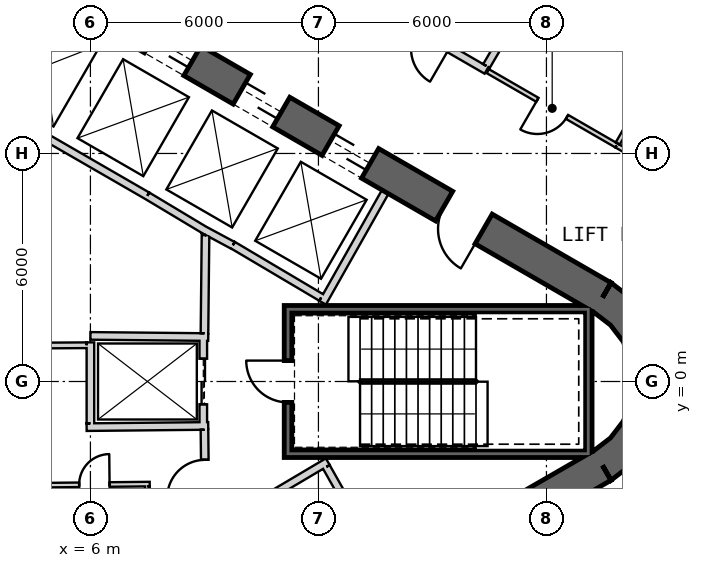
"""IFC4 building model, lengths in metres.
Left out: names, types, materials, properties, quantities, classifications, styles, units other than length and angle.
Written with IfcOpenShell. Run it as: python <this file> out.ifc"""

import sys

from ifc_helpers import new_model, si_unit, direction, frame, frame_2d, origin, place, context, subcontext, project, spatial, polyline, rectangle, outline, extrude, element, fill, save


model = new_model("IFC4")
c1 = context("Model", 3, precision=1e-05, world=origin(), true_north=direction((0.0, 1.0)))
c2 = subcontext(c1, "Body", "Model", "MODEL_VIEW")
j1 = project(units=[si_unit("LENGTHUNIT", "METRE"), si_unit("PLANEANGLEUNIT", "RADIAN")], contexts=[c1])
p1 = place(None, origin())
s1 = spatial("IfcSite", under=j1, at=p1, CompositionType="ELEMENT")
p2 = place(p1, origin())
s2 = spatial("IfcBuilding", under=s1, at=p2, CompositionType="ELEMENT")
p3 = place(p2, frame((0.0, 0.0, 45.5)))
s3 = spatial("IfcBuildingStorey", under=s2, at=p3, CompositionType="ELEMENT", Elevation=45.5)
p4 = place(p3, frame((19.475, 2.208, 0.0), z_axis=(0.0, 0.0, 1.0), x_axis=(-0.866028369851, 0.499994862586, 0.0)))
e1 = element("IfcWall", 1, at=p4, inside=s3, PredefinedType="SHEAR", context=c2, shape_type="SweptSolid", body=[
    extrude(rectangle(XDim=31.523, YDim=0.9, at=frame_2d((15.762, 0.0))), origin(), (0.0, 0.0, 1.0), 4.1),
])
p5 = place(p4, frame((7.062, 0.0, 0.0)))
e2 = element("IfcOpeningElement", 2, at=p5, cuts=e1, PredefinedType="OPENING", context=c2, shape_type="SweptSolid", body=[
    extrude(rectangle(XDim=1.2, YDim=2.4, at=frame_2d((0.6, 1.2))), frame((0.0, 0.46, 0.0), z_axis=(0.0, -1.0, 0.0), x_axis=(1.0, 0.0, 0.0)), (0.0, 0.0, 1.0), 0.92),
])
p6 = place(p4, frame((9.762, 0.0, 0.0)))
e3 = element("IfcOpeningElement", 3, at=p6, cuts=e1, PredefinedType="OPENING", context=c2, shape_type="SweptSolid", body=[
    extrude(rectangle(XDim=1.2, YDim=2.4, at=frame_2d((0.6, 1.2))), frame((0.0, 0.46, 0.0), z_axis=(0.0, -1.0, 0.0), x_axis=(1.0, 0.0, 0.0)), (0.0, 0.0, 1.0), 0.92),
])
p7 = place(p4, frame((12.462, 0.0, 0.0)))
e4 = element("IfcOpeningElement", 4, at=p7, cuts=e1, PredefinedType="OPENING", context=c2, shape_type="SweptSolid", body=[
    extrude(rectangle(XDim=1.2, YDim=2.4, at=frame_2d((0.6, 1.2))), frame((0.0, 0.46, 0.0), z_axis=(0.0, -1.0, 0.0), x_axis=(1.0, 0.0, 0.0)), (0.0, 0.0, 1.0), 0.92),
])
p8 = place(p4, frame((15.162, 0.0, 0.0)))
e5 = element("IfcOpeningElement", 5, at=p8, cuts=e1, PredefinedType="OPENING", context=c2, shape_type="SweptSolid", body=[
    extrude(rectangle(XDim=1.2, YDim=2.4, at=frame_2d((0.6, 1.2))), frame((0.0, 0.46, 0.0), z_axis=(0.0, -1.0, 0.0), x_axis=(1.0, 0.0, 0.0)), (0.0, 0.0, 1.0), 0.92),
])
p9 = place(p4, frame((17.862, 0.0, 0.0)))
e6 = element("IfcOpeningElement", 6, at=p9, cuts=e1, PredefinedType="OPENING", context=c2, shape_type="SweptSolid", body=[
    extrude(rectangle(XDim=1.2, YDim=2.4, at=frame_2d((0.6, 1.2))), frame((0.0, 0.46, 0.0), z_axis=(0.0, -1.0, 0.0), x_axis=(1.0, 0.0, 0.0)), (0.0, 0.0, 1.0), 0.92),
])
p10 = place(p4, frame((20.562, 0.0, 0.0)))
e7 = element("IfcOpeningElement", 7, at=p10, cuts=e1, PredefinedType="OPENING", context=c2, shape_type="SweptSolid", body=[
    extrude(rectangle(XDim=1.2, YDim=2.4, at=frame_2d((0.6, 1.2))), frame((0.0, 0.46, 0.0), z_axis=(0.0, -1.0, 0.0), x_axis=(1.0, 0.0, 0.0)), (0.0, 0.0, 1.0), 0.92),
])
p11 = place(p4, frame((23.262, 0.0, 0.0)))
e8 = element("IfcOpeningElement", 8, at=p11, cuts=e1, PredefinedType="OPENING", context=c2, shape_type="SweptSolid", body=[
    extrude(rectangle(XDim=1.2, YDim=2.4, at=frame_2d((0.6, 1.2))), frame((0.0, 0.46, 0.0), z_axis=(0.0, -1.0, 0.0), x_axis=(1.0, 0.0, 0.0)), (0.0, 0.0, 1.0), 0.92),
])
p12 = place(p4, frame((3.612, 0.0, 0.0)))
e9 = element("IfcOpeningElement", 9, at=p12, cuts=e1, PredefinedType="OPENING", context=c2, shape_type="SweptSolid", body=[
    extrude(rectangle(XDim=1.2, YDim=2.4, at=frame_2d((0.6, 1.2))), frame((0.0, 0.46, 0.0), z_axis=(0.0, -1.0, 0.0), x_axis=(1.0, 0.0, 0.0)), (0.0, 0.0, 1.0), 0.92),
])
p13 = place(p4, frame((26.712, 0.0, 0.0)))
e10 = element("IfcOpeningElement", 10, at=p13, cuts=e1, PredefinedType="OPENING", context=c2, shape_type="SweptSolid", body=[
    extrude(rectangle(XDim=1.2, YDim=2.4, at=frame_2d((0.6, 1.2))), frame((0.0, 0.46, 0.0), z_axis=(0.0, -1.0, 0.0), x_axis=(1.0, 0.0, 0.0)), (0.0, 0.0, 1.0), 0.92),
])
p14 = place(p3, frame((-7.825, -17.97, 0.0), z_axis=(0.0, 0.0, 1.0), x_axis=(0.866028369851, 0.499994862586, 0.0)))
e11 = element("IfcWall", 11, at=p14, inside=s3, PredefinedType="SHEAR", context=c2, shape_type="SweptSolid", body=[
    extrude(rectangle(XDim=31.523, YDim=0.9, at=frame_2d((15.762, 0.0))), origin(), (0.0, 0.0, 1.0), 4.1),
])
p15 = place(p14, frame((7.062, 0.0, 0.0)))
e12 = element("IfcOpeningElement", 12, at=p15, cuts=e11, PredefinedType="OPENING", context=c2, shape_type="SweptSolid", body=[
    extrude(rectangle(XDim=1.2, YDim=2.4, at=frame_2d((0.6, 1.2))), frame((0.0, 0.46, 0.0), z_axis=(0.0, -1.0, 0.0), x_axis=(1.0, 0.0, 0.0)), (0.0, 0.0, 1.0), 0.92),
])
p16 = place(p14, frame((9.762, 0.0, 0.0)))
e13 = element("IfcOpeningElement", 13, at=p16, cuts=e11, PredefinedType="OPENING", context=c2, shape_type="SweptSolid", body=[
    extrude(rectangle(XDim=1.2, YDim=2.4, at=frame_2d((0.6, 1.2))), frame((0.0, 0.46, 0.0), z_axis=(0.0, -1.0, 0.0), x_axis=(1.0, 0.0, 0.0)), (0.0, 0.0, 1.0), 0.92),
])
p17 = place(p14, frame((12.462, 0.0, 0.0)))
e14 = element("IfcOpeningElement", 14, at=p17, cuts=e11, PredefinedType="OPENING", context=c2, shape_type="SweptSolid", body=[
    extrude(rectangle(XDim=1.2, YDim=2.4, at=frame_2d((0.6, 1.2))), frame((0.0, 0.46, 0.0), z_axis=(0.0, -1.0, 0.0), x_axis=(1.0, 0.0, 0.0)), (0.0, 0.0, 1.0), 0.92),
])
p18 = place(p14, frame((15.162, 0.0, 0.0)))
e15 = element("IfcOpeningElement", 15, at=p18, cuts=e11, PredefinedType="OPENING", context=c2, shape_type="SweptSolid", body=[
    extrude(rectangle(XDim=1.2, YDim=2.4, at=frame_2d((0.6, 1.2))), frame((0.0, 0.46, 0.0), z_axis=(0.0, -1.0, 0.0), x_axis=(1.0, 0.0, 0.0)), (0.0, 0.0, 1.0), 0.92),
])
p19 = place(p14, frame((17.862, 0.0, 0.0)))
e16 = element("IfcOpeningElement", 16, at=p19, cuts=e11, PredefinedType="OPENING", context=c2, shape_type="SweptSolid", body=[
    extrude(rectangle(XDim=1.2, YDim=2.4, at=frame_2d((0.6, 1.2))), frame((0.0, 0.46, 0.0), z_axis=(0.0, -1.0, 0.0), x_axis=(1.0, 0.0, 0.0)), (0.0, 0.0, 1.0), 0.92),
])
p20 = place(p14, frame((20.562, 0.0, 0.0)))
e17 = element("IfcOpeningElement", 17, at=p20, cuts=e11, PredefinedType="OPENING", context=c2, shape_type="SweptSolid", body=[
    extrude(rectangle(XDim=1.2, YDim=2.4, at=frame_2d((0.6, 1.2))), frame((0.0, 0.46, 0.0), z_axis=(0.0, -1.0, 0.0), x_axis=(1.0, 0.0, 0.0)), (0.0, 0.0, 1.0), 0.92),
])
p21 = place(p14, frame((26.712, 0.0, 0.0)))
e18 = element("IfcOpeningElement", 18, at=p21, cuts=e11, PredefinedType="OPENING", context=c2, shape_type="SweptSolid", body=[
    extrude(rectangle(XDim=1.2, YDim=2.4, at=frame_2d((0.6, 1.2))), frame((0.0, 0.46, 0.0), z_axis=(0.0, -1.0, 0.0), x_axis=(1.0, 0.0, 0.0)), (0.0, 0.0, 1.0), 0.92),
])
p22 = place(p14, frame((3.612, 0.0, 0.0)))
e19 = element("IfcOpeningElement", 19, at=p22, cuts=e11, PredefinedType="OPENING", context=c2, shape_type="SweptSolid", body=[
    extrude(rectangle(XDim=1.2, YDim=2.4, at=frame_2d((0.6, 1.2))), frame((0.0, 0.46, 0.0), z_axis=(0.0, -1.0, 0.0), x_axis=(1.0, 0.0, 0.0)), (0.0, 0.0, 1.0), 0.92),
])
p23 = place(p3, origin())
e20 = element("IfcWall", 20, at=p23, inside=s3, PredefinedType="SHEAR", context=c2, shape_type="SweptSolid", body=[
    extrude(outline(polyline([(19.7, -2.598), (20.321, -2.121), (20.798, -1.5), (21.098, -0.777), (21.2, 0.0), (21.098, 0.777), (20.798, 1.5), (20.321, 2.121), (19.7, 2.598), (19.25, 1.819), (19.685, 1.485), (20.019, 1.05), (20.229, 0.543), (20.3, 0.0), (20.229, -0.543), (20.019, -1.05), (19.685, -1.485), (19.25, -1.819), (19.7, -2.598)])), origin(), (0.0, 0.0, 1.0), 4.1),
])
p24 = place(p3, frame((7.497, 4.886, 0.0), z_axis=(0.0, 0.0, 1.0), x_axis=(-0.866030989016, 0.499990325971, 0.0)))
e21 = element("IfcWall", 21, at=p24, inside=s3, PredefinedType="PLUMBINGWALL", context=c2, shape_type="SweptSolid", body=[
    extrude(rectangle(XDim=8.1, YDim=0.2, at=frame_2d((4.05, 0.0))), origin(), (0.0, 0.0, 1.0), 3.8),
])
p25 = place(p3, frame((12.11, 2.073, 0.0), z_axis=(0.0, 0.0, 1.0), x_axis=(0.49196600604, 0.870614408852, 0.0)))
e22 = element("IfcWall", 22, at=p25, inside=s3, PredefinedType="PLUMBINGWALL", context=c2, shape_type="SweptSolid", body=[
    extrude(rectangle(XDim=3.35, YDim=0.2, at=frame_2d((1.675, 0.0))), origin(), (0.0, 0.0, 1.0), 3.8),
])
p26 = place(p3, frame((12.073, 2.211, 0.0), z_axis=(0.0, 0.0, 1.0), x_axis=(-0.860438357912, 0.509554542943, 0.0)))
e23 = element("IfcWall", 23, at=p26, inside=s3, PredefinedType="PLUMBINGWALL", context=c2, shape_type="SweptSolid", body=[
    extrude(rectangle(XDim=2.7, YDim=0.2, at=frame_2d((1.35, 0.0))), origin(), (0.0, 0.0, 1.0), 3.8),
])
p27 = place(p3, frame((9.748, 3.583, 0.0), z_axis=(0.0, 0.0, 1.0), x_axis=(-0.880917147855, 0.473270513147, 0.0)))
e24 = element("IfcWall", 24, at=p27, inside=s3, PredefinedType="PLUMBINGWALL", context=c2, shape_type="SweptSolid", body=[
    extrude(rectangle(XDim=0.878, YDim=0.2, at=frame_2d((0.439, 0.0))), origin(), (0.0, 0.0, 1.0), 3.8),
])
p28 = place(p3, frame((9.079, 3.937, 0.0), z_axis=(0.0, 0.0, 1.0), x_axis=(-0.857516281273, 0.51445682749, 0.0)))
e25 = element("IfcWall", 25, at=p28, inside=s3, PredefinedType="PLUMBINGWALL", context=c2, shape_type="SweptSolid", body=[
    extrude(rectangle(XDim=1.845, YDim=0.2, at=frame_2d((0.922, 0.0))), origin(), (0.0, 0.0, 1.0), 3.8),
])
p29 = place(p3, frame((19.2, 1.9, -0.3), z_axis=(0.0, 0.0, 1.0), x_axis=(-1.0, 0.0, 0.0)))
e26 = element("IfcWall", 26, at=p29, inside=s3, PredefinedType="SHEAR", context=c2, shape_type="SweptSolid", body=[
    extrude(rectangle(XDim=8.1, YDim=0.2, at=frame_2d((4.05, 0.0))), origin(), (0.0, 0.0, 1.0), 4.1),
])
p30 = place(p3, frame((19.1, -2.0, -0.3), z_axis=(0.0, 0.0, 1.0), x_axis=(0.0, 1.0, 0.0)))
e27 = element("IfcWall", 27, at=p30, inside=s3, PredefinedType="SHEAR", context=c2, shape_type="SweptSolid", body=[
    extrude(rectangle(XDim=3.8, YDim=0.2, at=frame_2d((1.9, 0.0))), origin(), (0.0, 0.0, 1.0), 4.1),
])
p31 = place(p3, frame((11.1, -1.9, -0.3), z_axis=(0.0, 0.0, 1.0), x_axis=(1.0, 0.0, 0.0)))
e28 = element("IfcWall", 28, at=p31, inside=s3, PredefinedType="SHEAR", context=c2, shape_type="SweptSolid", body=[
    extrude(rectangle(XDim=7.9, YDim=0.2, at=frame_2d((3.95, 0.0))), origin(), (0.0, 0.0, 1.0), 4.1),
])
p32 = place(p3, frame((11.2, -1.8, -0.3), z_axis=(0.0, 0.0, 1.0), x_axis=(0.0, 1.0, 0.0)))
e29 = element("IfcWall", 29, at=p32, inside=s3, PredefinedType="SHEAR", context=c2, shape_type="SweptSolid", body=[
    extrude(rectangle(XDim=3.6, YDim=0.2, at=frame_2d((1.8, 0.0))), origin(), (0.0, 0.0, 1.0), 4.1),
])
p33 = place(p32, frame((1.25, 0.0, 0.3)))
e30 = element("IfcOpeningElement", 30, at=p33, cuts=e29, PredefinedType="OPENING", context=c2, shape_type="SweptSolid", body=[
    extrude(rectangle(XDim=1.1, YDim=2.1, at=frame_2d((0.55, 1.05))), frame((0.0, 0.11, 0.0), z_axis=(0.0, -1.0, 0.0), x_axis=(1.0, 0.0, 0.0)), (0.0, 0.0, 1.0), 0.22),
])
p34 = place(p3, frame((8.97, 1.2, 0.0), z_axis=(0.0, 0.0, 1.0), x_axis=(0.0, -1.0, 0.0)))
e31 = element("IfcWall", 31, at=p34, inside=s3, PredefinedType="PLUMBINGWALL", context=c2, shape_type="SweptSolid", body=[
    extrude(rectangle(XDim=2.4, YDim=0.2, at=frame_2d((1.2, 0.0))), origin(), (0.0, 0.0, 1.0), 3.8),
])
p35 = place(p34, frame((0.6, 0.0, 0.0)))
e32 = element("IfcOpeningElement", 32, at=p35, cuts=e31, PredefinedType="OPENING", context=c2, shape_type="SweptSolid", body=[
    extrude(rectangle(XDim=1.2, YDim=2.4, at=frame_2d((0.6, 1.2))), frame((0.0, 0.11, 0.0), z_axis=(0.0, -1.0, 0.0), x_axis=(1.0, 0.0, 0.0)), (0.0, 0.0, 1.0), 0.22),
])
p36 = place(p3, frame((6.0, 1.2, 0.0), z_axis=(0.0, 0.0, 1.0), x_axis=(0.999949988, -0.010001074852, 0.0)))
e33 = element("IfcWall", 33, at=p36, inside=s3, PredefinedType="PLUMBINGWALL", context=c2, shape_type="SweptSolid", body=[
    extrude(rectangle(XDim=3.1, YDim=0.2, at=frame_2d((1.55, 0.0))), origin(), (0.0, 0.0, 1.0), 3.8),
])
p37 = place(p3, frame((5.9, -1.201, 0.0), z_axis=(0.0, 0.0, 1.0), x_axis=(0.999950064753, 0.009993397809, 0.0)))
e34 = element("IfcWall", 34, at=p37, inside=s3, PredefinedType="PLUMBINGWALL", context=c2, shape_type="SweptSolid", body=[
    extrude(rectangle(XDim=3.2, YDim=0.2, at=frame_2d((1.6, 0.0))), origin(), (0.0, 0.0, 1.0), 3.8),
])
p38 = place(p3, frame((6.0, -1.1, 0.0), z_axis=(0.0, 0.0, 1.0), x_axis=(0.0, 1.0, 0.0)))
e35 = element("IfcWall", 35, at=p38, inside=s3, PredefinedType="PLUMBINGWALL", context=c2, shape_type="SweptSolid", body=[
    extrude(rectangle(XDim=2.13, YDim=0.2, at=frame_2d((1.065, 0.0))), origin(), (0.0, 0.0, 1.0), 3.8),
])
p39 = place(p3, frame((12.245, -2.109, 0.0), z_axis=(0.0, 0.0, 1.0), x_axis=(-0.860414880418, -0.509594185166, 0.0)))
e36 = element("IfcWall", 36, at=p39, inside=s3, PredefinedType="PARTITIONING", context=c2, shape_type="SweptSolid", body=[
    extrude(rectangle(XDim=2.7, YDim=0.2, at=frame_2d((1.35, 0.0))), origin(), (0.0, 0.0, 1.0), 3.8),
])
p40 = place(p3, frame((13.758, -4.99, 0.0), z_axis=(0.0, 0.0, 1.0), x_axis=(-0.491993409184, 0.87059892334, 0.0)))
e37 = element("IfcWall", 37, at=p40, inside=s3, PredefinedType="PARTITIONING", context=c2, shape_type="SweptSolid", body=[
    extrude(rectangle(XDim=3.15, YDim=0.2, at=frame_2d((1.575, 0.0))), origin(), (0.0, 0.0, 1.0), 3.8),
])
p41 = place(p40, frame((1.175, 0.0, 0.0)))
e38 = element("IfcOpeningElement", 38, at=p41, cuts=e37, PredefinedType="OPENING", context=c2, shape_type="SweptSolid", body=[
    extrude(rectangle(XDim=0.8, YDim=2.1, at=frame_2d((0.4, 1.05))), frame((0.0, 0.11, 0.0), z_axis=(0.0, -1.0, 0.0), x_axis=(1.0, 0.0, 0.0)), (0.0, 0.0, 1.0), 0.22),
])
p42 = place(p3, frame((9.001, 1.27, 0.0), z_axis=(0.0, 0.0, 1.0), x_axis=(0.010784614026, 0.999941844359, 0.0)))
e39 = element("IfcWall", 39, at=p42, inside=s3, PredefinedType="PARTITIONING", context=c2, shape_type="SweptSolid", body=[
    extrude(rectangle(XDim=2.581, YDim=0.2, at=frame_2d((1.291, 0.0))), origin(), (0.0, 0.0, 1.0), 3.8),
])
p43 = place(p3, frame((9.029, -3.851, 0.0), z_axis=(0.0, 0.0, 1.0), x_axis=(-0.010783593937, 0.99994185536, 0.0)))
e40 = element("IfcWall", 40, at=p43, inside=s3, PredefinedType="PARTITIONING", context=c2, shape_type="SweptSolid", body=[
    extrude(rectangle(XDim=2.581, YDim=0.2, at=frame_2d((1.291, 0.0))), origin(), (0.0, 0.0, 1.0), 3.8),
])
p44 = place(p43, frame((0.791, 0.0, 0.0)))
e41 = element("IfcOpeningElement", 41, at=p44, cuts=e40, PredefinedType="OPENING", context=c2, shape_type="SweptSolid", body=[
    extrude(rectangle(XDim=1.0, YDim=2.1, at=frame_2d((0.5, 1.05))), frame((0.0, 0.11, 0.0), z_axis=(0.0, -1.0, 0.0), x_axis=(1.0, 0.0, 0.0)), (0.0, 0.0, 1.0), 0.22),
])
p45 = place(p3, frame((1.214, 0.924, 0.0), z_axis=(0.0, 0.0, 1.0), x_axis=(0.999979796062, 0.006356686907, 0.0)))
e42 = element("IfcWall", 42, at=p45, inside=s3, PredefinedType="PLUMBINGWALL", context=c2, shape_type="SweptSolid", body=[
    extrude(rectangle(XDim=4.686, YDim=0.15, at=frame_2d((2.343, 0.0))), origin(), (0.0, 0.0, 1.0), 3.8),
])
p46 = place(p45, frame((2.007, 0.0, 0.0)))
e43 = element("IfcOpeningElement", 43, at=p46, cuts=e42, PredefinedType="OPENING", context=c2, shape_type="SweptSolid", body=[
    extrude(rectangle(XDim=0.8, YDim=2.1, at=frame_2d((0.4, 1.05))), frame((0.0, 0.085, 0.0), z_axis=(0.0, -1.0, 0.0), x_axis=(1.0, 0.0, 0.0)), (0.0, 0.0, 1.0), 0.17),
])
p47 = place(p3, frame((7.56, -2.699, 0.0), z_axis=(0.0, 0.0, 1.0), x_axis=(-0.999948120507, -0.010186083405, 0.0)))
e44 = element("IfcWall", 44, at=p47, inside=s3, PredefinedType="PARTITIONING", context=c2, shape_type="SweptSolid", body=[
    extrude(rectangle(XDim=2.852, YDim=0.12, at=frame_2d((1.426, 0.0))), origin(), (0.0, 0.0, 1.0), 3.8),
])
p48 = place(p47, frame((1.056, 0.0, 0.0)))
e45 = element("IfcOpeningElement", 45, at=p48, cuts=e44, PredefinedType="OPENING", context=c2, shape_type="SweptSolid", body=[
    extrude(rectangle(XDim=0.8, YDim=2.1, at=frame_2d((0.4, 1.05))), frame((0.0, 0.07, 0.0), z_axis=(0.0, -1.0, 0.0), x_axis=(1.0, 0.0, 0.0)), (0.0, 0.0, 1.0), 0.14),
])
p49 = place(p3, frame((7.475, -4.865, 0.0), z_axis=(0.0, 0.0, 1.0), x_axis=(0.011716133148, 0.999931363757, 0.0)))
e46 = element("IfcWall", 46, at=p49, inside=s3, PredefinedType="PARTITIONING", context=c2, shape_type="SweptSolid", body=[
    extrude(rectangle(XDim=2.105, YDim=0.12, at=frame_2d((1.052, 0.0))), origin(), (0.0, 0.0, 1.0), 3.8),
])
p50 = place(p3, frame((16.423, 8.185, 0.0), z_axis=(0.0, 0.0, 1.0), x_axis=(-0.866026561282, 0.49999799515, 0.0)))
e47 = element("IfcWall", 47, at=p50, inside=s3, PredefinedType="PARTITIONING", context=c2, shape_type="SweptSolid", body=[
    extrude(rectangle(XDim=26.435, YDim=0.2, at=frame_2d((13.218, 0.0))), origin(), (0.0, 0.0, 1.0), 2.98),
])
p51 = place(p50, frame((14.356, 0.0, 0.0)))
e48 = element("IfcOpeningElement", 48, at=p51, cuts=e47, PredefinedType="OPENING", context=c2, shape_type="SweptSolid", body=[
    extrude(rectangle(XDim=1.0, YDim=2.1, at=frame_2d((0.5, 1.05))), frame((0.0, 0.11, 0.0), z_axis=(0.0, -1.0, 0.0), x_axis=(1.0, 0.0, 0.0)), (0.0, 0.0, 1.0), 0.22),
])
p52 = place(p50, frame((1.139, 0.0, 0.0)))
e49 = element("IfcOpeningElement", 49, at=p52, cuts=e47, PredefinedType="OPENING", context=c2, shape_type="SweptSolid", body=[
    extrude(rectangle(XDim=1.0, YDim=2.1, at=frame_2d((0.5, 1.05))), frame((0.0, 0.11, 0.0), z_axis=(0.0, -1.0, 0.0), x_axis=(1.0, 0.0, 0.0)), (0.0, 0.0, 1.0), 0.22),
])
p53 = place(p3, frame((21.909, 5.018, 0.0), z_axis=(0.0, 0.0, 1.0), x_axis=(-0.866054279967, 0.499949981648, 0.0)))
e50 = element("IfcWall", 50, at=p53, inside=s3, PredefinedType="PARTITIONING", context=c2, shape_type="SweptSolid", body=[
    extrude(rectangle(XDim=2.384, YDim=0.12, at=frame_2d((1.192, 0.0))), origin(), (0.0, 0.0, 1.0), 2.98),
])
p54 = place(p3, frame((19.845, 6.209, 0.0), z_axis=(0.0, 0.0, 1.0), x_axis=(-0.866002635216, 0.500039434245, 0.0)))
e51 = element("IfcWall", 51, at=p54, inside=s3, PredefinedType="PARTITIONING", context=c2, shape_type="SweptSolid", body=[
    extrude(rectangle(XDim=3.911, YDim=0.12, at=frame_2d((1.956, 0.0))), origin(), (0.0, 0.0, 1.0), 3.8),
])
p55 = place(p54, frame((1.506, 0.0, 0.0)))
e52 = element("IfcOpeningElement", 52, at=p55, cuts=e51, PredefinedType="OPENING", context=c2, shape_type="SweptSolid", body=[
    extrude(rectangle(XDim=0.9, YDim=2.1, at=frame_2d((0.45, 1.05))), frame((0.0, 0.07, 0.0), z_axis=(0.0, -1.0, 0.0), x_axis=(1.0, 0.0, 0.0)), (0.0, 0.0, 1.0), 0.14),
])
p56 = place(p3, frame((18.351, 11.587, 0.0), z_axis=(0.0, 0.0, 1.0), x_axis=(-0.506482355277, -0.862250325482, 0.0)))
e53 = element("IfcWall", 53, at=p56, inside=s3, PredefinedType="PARTITIONING", context=c2, shape_type="SweptSolid", body=[
    extrude(rectangle(XDim=3.81, YDim=0.2, at=frame_2d((1.905, 0.0))), origin(), (0.0, 0.0, 1.0), 2.98),
])
p57 = place(p3, frame((21.8, 9.596, 0.0), z_axis=(0.0, 0.0, 1.0), x_axis=(-0.500006057782, -0.866021906294, 0.0)))
e54 = element("IfcWall", 54, at=p57, inside=s3, PredefinedType="PARTITIONING", context=c2, shape_type="SweptSolid", body=[
    extrude(rectangle(XDim=3.85, YDim=0.12, at=frame_2d((1.925, 0.0))), origin(), (0.0, 0.0, 1.0), 3.8),
])
p58 = place(p33, origin())
e55 = element("IfcDoor", 55, at=p58, inside=s3, OperationType="SINGLE_SWING_LEFT", PredefinedType="USERDEFINED", context=c2, shape_type="SweptSolid", body=[
    extrude(rectangle(XDim=1.1, YDim=2.1, at=frame_2d((0.55, 1.05))), frame((0.0, 0.025, 0.0), z_axis=(0.0, -1.0, 0.0), x_axis=(1.0, 0.0, 0.0)), (0.0, 0.0, 1.0), 0.05),
])
fill(e30, e55)
p59 = place(p44, origin())
e56 = element("IfcDoor", 56, at=p59, inside=s3, OperationType="SINGLE_SWING_LEFT", PredefinedType="USERDEFINED", context=c2, shape_type="SweptSolid", body=[
    extrude(rectangle(XDim=1.0, YDim=2.1, at=frame_2d((0.5, 1.05))), frame((0.0, 0.025, 0.0), z_axis=(0.0, -1.0, 0.0), x_axis=(1.0, 0.0, 0.0)), (0.0, 0.0, 1.0), 0.05),
])
fill(e41, e56)
p60 = place(p35, origin())
e57 = element("IfcDoor", 57, at=p60, inside=s3, OperationType="SLIDING_TO_LEFT", PredefinedType="USERDEFINED", context=c2, shape_type="SweptSolid", body=[
    extrude(rectangle(XDim=1.2, YDim=2.4, at=frame_2d((0.6, 1.2))), frame((0.0, 0.025, 0.0), z_axis=(0.0, -1.0, 0.0), x_axis=(1.0, 0.0, 0.0)), (0.0, 0.0, 1.0), 0.05),
])
fill(e32, e57)
p61 = place(p48, origin())
e58 = element("IfcDoor", 58, at=p61, inside=s3, OperationType="SINGLE_SWING_RIGHT", PredefinedType="USERDEFINED", context=c2, shape_type="SweptSolid", body=[
    extrude(rectangle(XDim=0.8, YDim=2.1, at=frame_2d((0.4, 1.05))), frame((0.0, 0.025, 0.0), z_axis=(0.0, -1.0, 0.0), x_axis=(1.0, 0.0, 0.0)), (0.0, 0.0, 1.0), 0.05),
])
fill(e45, e58)
p62 = place(p55, origin())
e59 = element("IfcDoor", 59, at=p62, inside=s3, OperationType="SINGLE_SWING_LEFT", PredefinedType="NOTDEFINED", context=c2, shape_type="SweptSolid", body=[
    extrude(rectangle(XDim=0.9, YDim=2.1, at=frame_2d((0.45, 1.05))), frame((0.0, 0.025, 0.0), z_axis=(0.0, -1.0, 0.0), x_axis=(1.0, 0.0, 0.0)), (0.0, 0.0, 1.0), 0.05),
])
fill(e52, e59)
p63 = place(p5, origin())
e60 = element("IfcDoor", 60, at=p63, inside=s3, OperationType="SLIDING_TO_LEFT", PredefinedType="USERDEFINED", context=c2, shape_type="SweptSolid", body=[
    extrude(rectangle(XDim=1.2, YDim=2.4, at=frame_2d((0.6, 1.2))), frame((0.0, 0.025, 0.0), z_axis=(0.0, -1.0, 0.0), x_axis=(1.0, 0.0, 0.0)), (0.0, 0.0, 1.0), 0.05),
])
fill(e2, e60)
p64 = place(p6, origin())
e61 = element("IfcDoor", 61, at=p64, inside=s3, OperationType="SLIDING_TO_LEFT", PredefinedType="USERDEFINED", context=c2, shape_type="SweptSolid", body=[
    extrude(rectangle(XDim=1.2, YDim=2.4, at=frame_2d((0.6, 1.2))), frame((0.0, 0.025, 0.0), z_axis=(0.0, -1.0, 0.0), x_axis=(1.0, 0.0, 0.0)), (0.0, 0.0, 1.0), 0.05),
])
fill(e3, e61)
p65 = place(p7, origin())
e62 = element("IfcDoor", 62, at=p65, inside=s3, OperationType="SLIDING_TO_LEFT", PredefinedType="USERDEFINED", context=c2, shape_type="SweptSolid", body=[
    extrude(rectangle(XDim=1.2, YDim=2.4, at=frame_2d((0.6, 1.2))), frame((0.0, 0.025, 0.0), z_axis=(0.0, -1.0, 0.0), x_axis=(1.0, 0.0, 0.0)), (0.0, 0.0, 1.0), 0.05),
])
fill(e4, e62)
p66 = place(p12, origin())
e63 = element("IfcDoor", 63, at=p66, inside=s3, OperationType="SINGLE_SWING_LEFT", PredefinedType="USERDEFINED", context=c2, shape_type="SweptSolid", body=[
    extrude(rectangle(XDim=1.2, YDim=2.4, at=frame_2d((0.6, 1.2))), frame((0.0, 0.025, 0.0), z_axis=(0.0, -1.0, 0.0), x_axis=(1.0, 0.0, 0.0)), (0.0, 0.0, 1.0), 0.05),
])
fill(e9, e63)
save(model, sys.argv[1])
